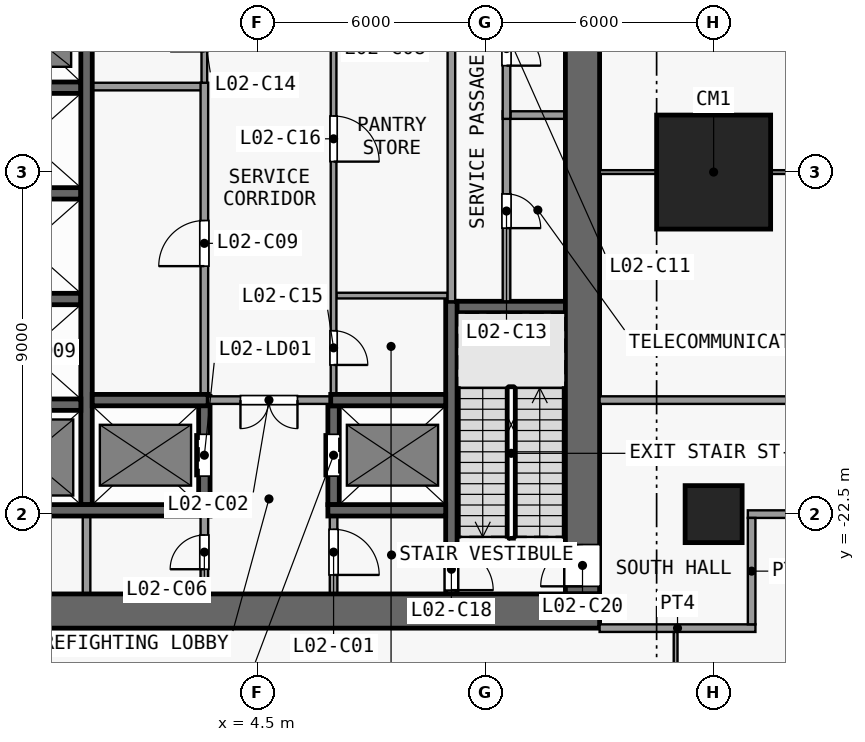
"""IFC4 building model, lengths in metres.
Left out: names, types, materials, properties, quantities, classifications, styles, units other than length and angle.
Written with IfcOpenShell. Run it as: python <this file> out.ifc"""

import sys

from ifc_helpers import new_model, si_unit, direction, frame, frame_2d, origin, origin_2d, place, context, subcontext, project, spatial, rectangle, extrude, element, fill, save


model = new_model("IFC4")
c1 = context("Model", 3, precision=1e-05, world=origin(), true_north=direction((0.0, 1.0)))
c2 = subcontext(c1, "Body", "Model", "MODEL_VIEW")
j1 = project(units=[si_unit("LENGTHUNIT", "METRE"), si_unit("PLANEANGLEUNIT", "RADIAN")], contexts=[c1])
p1 = place(None, origin())
s1 = spatial("IfcSite", under=j1, at=p1, CompositionType="ELEMENT")
p2 = place(p1, origin())
s2 = spatial("IfcBuilding", under=s1, at=p2, CompositionType="ELEMENT")
p3 = place(p2, frame((0.0, 0.0, 13.5)))
s3 = spatial("IfcBuildingStorey", under=s2, at=p3, CompositionType="ELEMENT", Elevation=13.5)
p4 = place(p3, frame((16.5, -22.5, 0.0), z_axis=(0.0, 0.0, 1.0), x_axis=(1.0, 0.0, 0.0)))
e1 = element("IfcColumn", 1, at=p4, inside=s3, PredefinedType="COLUMN", context=c2, shape_type="SweptSolid", body=[
    extrude(rectangle(XDim=1.5, YDim=1.5, at=origin_2d()), origin(), (0.0, 0.0, 1.0), 5.0),
])
p5 = place(p3, frame((16.5, -13.5, 0.0), z_axis=(0.0, 0.0, 1.0), x_axis=(1.0, 0.0, 0.0)))
e2 = element("IfcColumn", 2, at=p5, inside=s3, PredefinedType="COLUMN", context=c2, shape_type="SweptSolid", body=[
    extrude(rectangle(XDim=3.0, YDim=3.0, at=origin_2d()), origin(), (0.0, 0.0, 1.0), 5.0),
])
p6 = place(p3, frame((-13.5, -25.05, 0.0), z_axis=(0.0, 0.0, 1.0), x_axis=(1.0, 0.0, 0.0)))
e3 = element("IfcWall", 3, at=p6, inside=s3, PredefinedType="SHEAR", context=c2, shape_type="SweptSolid", body=[
    extrude(rectangle(XDim=27.0, YDim=0.9, at=frame_2d((13.5, 0.0))), origin(), (0.0, 0.0, 1.0), 4.65),
])
p7 = place(p3, frame((13.05, -24.6, 0.0), z_axis=(0.0, 0.0, 1.0), x_axis=(0.0, 1.0, 0.0)))
e4 = element("IfcWall", 4, at=p7, inside=s3, PredefinedType="SHEAR", context=c2, shape_type="SweptSolid", body=[
    extrude(rectangle(XDim=16.1, YDim=0.9, at=frame_2d((8.05, 0.0))), origin(), (0.0, 0.0, 1.0), 4.65),
])
p8 = place(p7, frame((0.2, 0.0, 0.0)))
e5 = element("IfcOpeningElement", 5, at=p8, cuts=e4, PredefinedType="OPENING", context=c2, shape_type="SweptSolid", body=[
    extrude(rectangle(XDim=1.1, YDim=2.1, at=frame_2d((0.55, 1.05))), frame((0.0, 0.46, 0.0), z_axis=(0.0, -1.0, 0.0), x_axis=(1.0, 0.0, 0.0)), (0.0, 0.0, 1.0), 0.92),
])
p9 = place(p3, frame((-2.95, -22.4, 0.0), z_axis=(0.0, 0.0, 1.0), x_axis=(1.0, 0.0, 0.0)))
e6 = element("IfcWall", 6, at=p9, inside=s3, PredefinedType="SHEAR", context=c2, shape_type="SweptSolid", body=[
    extrude(rectangle(XDim=6.2, YDim=0.3, at=frame_2d((3.1, 0.0))), origin(), (0.0, 0.0, 1.0), 4.65),
])
p10 = place(p3, frame((6.35, -22.4, 0.0), z_axis=(0.0, 0.0, 1.0), x_axis=(1.0, 0.0, 0.0)))
e7 = element("IfcWall", 7, at=p10, inside=s3, PredefinedType="SHEAR", context=c2, shape_type="SweptSolid", body=[
    extrude(rectangle(XDim=3.1, YDim=0.3, at=frame_2d((1.55, 0.0))), origin(), (0.0, 0.0, 1.0), 4.65),
])
p11 = place(p3, frame((-2.95, -19.62, 0.0), z_axis=(0.0, 0.0, 1.0), x_axis=(1.0, 0.0, 0.0)))
e8 = element("IfcWall", 8, at=p11, inside=s3, PredefinedType="SHEAR", context=c2, shape_type="SweptSolid", body=[
    extrude(rectangle(XDim=2.8, YDim=0.3, at=frame_2d((1.4, 0.0))), origin(), (0.0, 0.0, 1.0), 4.65),
])
p12 = place(p3, frame((0.15, -19.5, 0.0), z_axis=(0.0, 0.0, 1.0), x_axis=(1.0, 0.0, 0.0)))
e9 = element("IfcWall", 9, at=p12, inside=s3, PredefinedType="SHEAR", context=c2, shape_type="SweptSolid", body=[
    extrude(rectangle(XDim=3.05, YDim=0.3, at=frame_2d((1.525, 0.0))), origin(), (0.0, 0.0, 1.0), 4.65),
])
p13 = place(p3, frame((6.575, -19.5, 0.0), z_axis=(0.0, 0.0, 1.0), x_axis=(-1.0, 0.0, 0.0)))
e10 = element("IfcWall", 10, at=p13, inside=s3, PredefinedType="PARTITIONING", context=c2, shape_type="SweptSolid", body=[
    extrude(rectangle(XDim=3.375, YDim=0.2, at=frame_2d((1.688, 0.0))), origin(), (0.0, 0.0, 1.0), 4.65),
])
p14 = place(p13, frame((1.025, 0.0, 0.0)))
e11 = element("IfcOpeningElement", 11, at=p14, cuts=e10, PredefinedType="OPENING", context=c2, shape_type="SweptSolid", body=[
    extrude(rectangle(XDim=1.5, YDim=2.1, at=frame_2d((0.75, 1.05))), frame((0.0, 0.11, 0.0), z_axis=(0.0, -1.0, 0.0), x_axis=(1.0, 0.0, 0.0)), (0.0, 0.0, 1.0), 0.22),
])
p15 = place(p3, frame((6.425, -19.5, 0.0), z_axis=(0.0, 0.0, 1.0), x_axis=(1.0, 0.0, 0.0)))
e12 = element("IfcWall", 12, at=p15, inside=s3, PredefinedType="SHEAR", context=c2, shape_type="SweptSolid", body=[
    extrude(rectangle(XDim=3.025, YDim=0.3, at=frame_2d((1.512, 0.0))), origin(), (0.0, 0.0, 1.0), 4.65),
])
p16 = place(p3, frame((9.5, -17.05, 0.0), z_axis=(0.0, 0.0, 1.0), x_axis=(1.0, 0.0, 0.0)))
e13 = element("IfcWall", 13, at=p16, inside=s3, PredefinedType="SHEAR", context=c2, shape_type="SweptSolid", body=[
    extrude(rectangle(XDim=3.1, YDim=0.3, at=frame_2d((1.55, 0.0))), origin(), (0.0, 0.0, 1.0), 4.65),
])
p17 = place(p3, frame((-2.95, -16.84, 0.0), z_axis=(0.0, 0.0, 1.0), x_axis=(1.0, 0.0, 0.0)))
e14 = element("IfcWall", 14, at=p17, inside=s3, PredefinedType="SHEAR", context=c2, shape_type="SweptSolid", body=[
    extrude(rectangle(XDim=2.8, YDim=0.3, at=frame_2d((1.4, 0.0))), origin(), (0.0, 0.0, 1.0), 4.65),
])
p18 = place(p3, frame((6.575, -16.75, 0.0), z_axis=(0.0, 0.0, 1.0), x_axis=(1.0, 0.0, 0.0)))
e15 = element("IfcWall", 15, at=p18, inside=s3, PredefinedType="PARTITIONING", context=c2, shape_type="SweptSolid", body=[
    extrude(rectangle(XDim=2.925, YDim=0.15, at=frame_2d((1.462, 0.0))), origin(), (0.0, 0.0, 1.0), 4.65),
])
p19 = place(p3, frame((-2.95, -14.06, 0.0), z_axis=(0.0, 0.0, 1.0), x_axis=(1.0, 0.0, 0.0)))
e16 = element("IfcWall", 16, at=p19, inside=s3, PredefinedType="SHEAR", context=c2, shape_type="SweptSolid", body=[
    extrude(rectangle(XDim=2.8, YDim=0.3, at=frame_2d((1.4, 0.0))), origin(), (0.0, 0.0, 1.0), 4.65),
])
p20 = place(p3, frame((11.15, -12.0, 0.0), z_axis=(0.0, 0.0, 1.0), x_axis=(1.0, 0.0, 0.0)))
e17 = element("IfcWall", 17, at=p20, inside=s3, PredefinedType="PARTITIONING", context=c2, shape_type="SweptSolid", body=[
    extrude(rectangle(XDim=1.45, YDim=0.2, at=frame_2d((0.725, 0.0))), origin(), (0.0, 0.0, 1.0), 4.65),
])
p21 = place(p3, frame((-2.95, -11.28, 0.0), z_axis=(0.0, 0.0, 1.0), x_axis=(1.0, 0.0, 0.0)))
e18 = element("IfcWall", 18, at=p21, inside=s3, PredefinedType="SHEAR", context=c2, shape_type="SweptSolid", body=[
    extrude(rectangle(XDim=2.8, YDim=0.3, at=frame_2d((1.4, 0.0))), origin(), (0.0, 0.0, 1.0), 4.65),
])
p22 = place(p3, frame((0.15, -11.25, 0.0), z_axis=(0.0, 0.0, 1.0), x_axis=(1.0, 0.0, 0.0)))
e19 = element("IfcWall", 19, at=p22, inside=s3, PredefinedType="PARTITIONING", context=c2, shape_type="SweptSolid", body=[
    extrude(rectangle(XDim=3.025, YDim=0.2, at=frame_2d((1.513, 0.0))), origin(), (0.0, 0.0, 1.0), 4.65),
])
p23 = place(p3, frame((0.0, -24.6, 0.0), z_axis=(0.0, 0.0, 1.0), x_axis=(0.0, 1.0, 0.0)))
e20 = element("IfcWall", 20, at=p23, inside=s3, PredefinedType="PARTITIONING", context=c2, shape_type="SweptSolid", body=[
    extrude(rectangle(XDim=2.05, YDim=0.2, at=frame_2d((1.025, 0.0))), origin(), (0.0, 0.0, 1.0), 4.65),
])
p24 = place(p3, frame((0.0, -22.25, 0.0), z_axis=(0.0, 0.0, 1.0), x_axis=(0.0, 1.0, 0.0)))
e21 = element("IfcWall", 21, at=p24, inside=s3, PredefinedType="SHEAR", context=c2, shape_type="SweptSolid", body=[
    extrude(rectangle(XDim=13.75, YDim=0.3, at=frame_2d((6.875, 0.0))), origin(), (0.0, 0.0, 1.0), 4.65),
])
p25 = place(p3, frame((3.1, -24.6, 0.0), z_axis=(0.0, 0.0, 1.0), x_axis=(0.0, 1.0, 0.0)))
e22 = element("IfcWall", 22, at=p25, inside=s3, PredefinedType="PARTITIONING", context=c2, shape_type="SweptSolid", body=[
    extrude(rectangle(XDim=2.05, YDim=0.2, at=frame_2d((1.025, 0.0))), origin(), (0.0, 0.0, 1.0), 4.65),
])
p26 = place(p25, frame((0.65, 0.0, 0.0)))
e23 = element("IfcOpeningElement", 23, at=p26, cuts=e22, PredefinedType="OPENING", context=c2, shape_type="SweptSolid", body=[
    extrude(rectangle(XDim=0.9, YDim=2.1, at=frame_2d((0.45, 1.05))), frame((0.0, 0.11, 0.0), z_axis=(0.0, -1.0, 0.0), x_axis=(1.0, 0.0, 0.0)), (0.0, 0.0, 1.0), 0.22),
])
p27 = place(p3, frame((3.1, -22.25, 0.0), z_axis=(0.0, 0.0, 1.0), x_axis=(0.0, 1.0, 0.0)))
e24 = element("IfcWall", 24, at=p27, inside=s3, PredefinedType="SHEAR", context=c2, shape_type="SweptSolid", body=[
    extrude(rectangle(XDim=2.85, YDim=0.3, at=frame_2d((1.425, 0.0))), origin(), (0.0, 0.0, 1.0), 4.65),
])
p28 = place(p27, frame((0.75, 0.0, 0.0)))
e25 = element("IfcOpeningElement", 25, at=p28, cuts=e24, PredefinedType="OPENING", context=c2, shape_type="SweptSolid", body=[
    extrude(rectangle(XDim=1.1, YDim=2.1, at=frame_2d((0.55, 1.05))), frame((0.0, 0.16, 0.0), z_axis=(0.0, -1.0, 0.0), x_axis=(1.0, 0.0, 0.0)), (0.0, 0.0, 1.0), 0.32),
])
p29 = place(p3, frame((3.1, -19.6, 0.0), z_axis=(0.0, 0.0, 1.0), x_axis=(0.0, 1.0, 0.0)))
e26 = element("IfcWall", 26, at=p29, inside=s3, PredefinedType="PARTITIONING", context=c2, shape_type="SweptSolid", body=[
    extrude(rectangle(XDim=8.45, YDim=0.2, at=frame_2d((4.225, 0.0))), origin(), (0.0, 0.0, 1.0), 4.65),
])
p30 = place(p29, frame((3.625, 0.0, 0.0)))
e27 = element("IfcOpeningElement", 27, at=p30, cuts=e26, PredefinedType="OPENING", context=c2, shape_type="SweptSolid", body=[
    extrude(rectangle(XDim=1.2, YDim=2.1, at=frame_2d((0.6, 1.05))), frame((0.0, 0.11, 0.0), z_axis=(0.0, -1.0, 0.0), x_axis=(1.0, 0.0, 0.0)), (0.0, 0.0, 1.0), 0.22),
])
p31 = place(p3, frame((3.1, -11.15, 0.0), z_axis=(0.0, 0.0, 1.0), x_axis=(0.0, 1.0, 0.0)))
e28 = element("IfcWall", 28, at=p31, inside=s3, PredefinedType="PARTITIONING", context=c2, shape_type="SweptSolid", body=[
    extrude(rectangle(XDim=2.65, YDim=0.15, at=frame_2d((1.325, 0.0))), origin(), (0.0, 0.0, 1.0), 4.65),
])
p32 = place(p31, frame((0.825, 0.0, 0.0)))
e29 = element("IfcOpeningElement", 29, at=p32, cuts=e28, PredefinedType="OPENING", context=c2, shape_type="SweptSolid", body=[
    extrude(rectangle(XDim=0.9, YDim=2.1, at=frame_2d((0.45, 1.05))), frame((0.0, 0.085, 0.0), z_axis=(0.0, -1.0, 0.0), x_axis=(1.0, 0.0, 0.0)), (0.0, 0.0, 1.0), 0.17),
])
p33 = place(p3, frame((6.5, -22.55, 0.0), z_axis=(0.0, 0.0, 1.0), x_axis=(0.0, -1.0, 0.0)))
e30 = element("IfcWall", 30, at=p33, inside=s3, PredefinedType="PARTITIONING", context=c2, shape_type="SweptSolid", body=[
    extrude(rectangle(XDim=2.05, YDim=0.2, at=frame_2d((1.025, 0.0))), origin(), (0.0, 0.0, 1.0), 4.65),
])
p34 = place(p33, frame((0.35, 0.0, 0.0)))
e31 = element("IfcOpeningElement", 31, at=p34, cuts=e30, PredefinedType="OPENING", context=c2, shape_type="SweptSolid", body=[
    extrude(rectangle(XDim=1.2, YDim=2.1, at=frame_2d((0.6, 1.05))), frame((0.0, 0.11, 0.0), z_axis=(0.0, -1.0, 0.0), x_axis=(1.0, 0.0, 0.0)), (0.0, 0.0, 1.0), 0.22),
])
p35 = place(p3, frame((6.5, -22.25, 0.0), z_axis=(0.0, 0.0, 1.0), x_axis=(0.0, 1.0, 0.0)))
e32 = element("IfcWall", 32, at=p35, inside=s3, PredefinedType="SHEAR", context=c2, shape_type="SweptSolid", body=[
    extrude(rectangle(XDim=2.6, YDim=0.3, at=frame_2d((1.3, 0.0))), origin(), (0.0, 0.0, 1.0), 4.65),
])
p36 = place(p35, frame((0.75, 0.0, 0.0)))
e33 = element("IfcOpeningElement", 33, at=p36, cuts=e32, PredefinedType="OPENING", context=c2, shape_type="SweptSolid", body=[
    extrude(rectangle(XDim=1.1, YDim=2.1, at=frame_2d((0.55, 1.05))), frame((0.0, 0.16, 0.0), z_axis=(0.0, -1.0, 0.0), x_axis=(1.0, 0.0, 0.0)), (0.0, 0.0, 1.0), 0.32),
])
p37 = place(p3, frame((6.5, -8.5, 0.0), z_axis=(0.0, 0.0, 1.0), x_axis=(0.0, -1.0, 0.0)))
e34 = element("IfcWall", 34, at=p37, inside=s3, PredefinedType="PARTITIONING", context=c2, shape_type="SweptSolid", body=[
    extrude(rectangle(XDim=10.85, YDim=0.15, at=frame_2d((5.425, 0.0))), origin(), (0.0, 0.0, 1.0), 4.65),
])
p38 = place(p37, frame((9.175, 0.0, 0.0)))
e35 = element("IfcOpeningElement", 35, at=p38, cuts=e34, PredefinedType="OPENING", context=c2, shape_type="SweptSolid", body=[
    extrude(rectangle(XDim=0.9, YDim=2.1, at=frame_2d((0.45, 1.05))), frame((0.0, 0.085, 0.0), z_axis=(0.0, -1.0, 0.0), x_axis=(1.0, 0.0, 0.0)), (0.0, 0.0, 1.0), 0.17),
])
p39 = place(p37, frame((3.525, 0.0, 0.0)))
e36 = element("IfcOpeningElement", 36, at=p39, cuts=e34, PredefinedType="OPENING", context=c2, shape_type="SweptSolid", body=[
    extrude(rectangle(XDim=1.2, YDim=2.1, at=frame_2d((0.6, 1.05))), frame((0.0, 0.085, 0.0), z_axis=(0.0, -1.0, 0.0), x_axis=(1.0, 0.0, 0.0)), (0.0, 0.0, 1.0), 0.17),
])
p40 = place(p3, frame((9.6, -16.9, 0.0), z_axis=(0.0, 0.0, 1.0), x_axis=(0.0, -1.0, 0.0)))
e37 = element("IfcWall", 37, at=p40, inside=s3, PredefinedType="SHEAR", context=c2, shape_type="SweptSolid", body=[
    extrude(rectangle(XDim=7.7, YDim=0.3, at=frame_2d((3.85, 0.0))), origin(), (0.0, 0.0, 1.0), 4.65),
])
p41 = place(p40, frame((6.5, 0.0, 0.0)))
e38 = element("IfcOpeningElement", 38, at=p41, cuts=e37, PredefinedType="OPENING", context=c2, shape_type="SweptSolid", body=[
    extrude(rectangle(XDim=1.1, YDim=2.1, at=frame_2d((0.55, 1.05))), frame((0.0, 0.16, 0.0), z_axis=(0.0, -1.0, 0.0), x_axis=(1.0, 0.0, 0.0)), (0.0, 0.0, 1.0), 0.32),
])
p42 = place(p3, frame((9.6, -16.9, 0.0), z_axis=(0.0, 0.0, 1.0), x_axis=(0.0, 1.0, 0.0)))
e39 = element("IfcWall", 39, at=p42, inside=s3, PredefinedType="PARTITIONING", context=c2, shape_type="SweptSolid", body=[
    extrude(rectangle(XDim=8.4, YDim=0.2, at=frame_2d((4.2, 0.0))), origin(), (0.0, 0.0, 1.0), 4.65),
])
p43 = place(p3, frame((11.05, -11.9, 0.0), z_axis=(0.0, 0.0, 1.0), x_axis=(0.0, -1.0, 0.0)))
e40 = element("IfcWall", 40, at=p43, inside=s3, PredefinedType="PARTITIONING", context=c2, shape_type="SweptSolid", body=[
    extrude(rectangle(XDim=5.0, YDim=0.2, at=frame_2d((2.5, 0.0))), origin(), (0.0, 0.0, 1.0), 4.65),
])
p44 = place(p43, frame((2.175, 0.0, 0.0)))
e41 = element("IfcOpeningElement", 41, at=p44, cuts=e40, PredefinedType="OPENING", context=c2, shape_type="SweptSolid", body=[
    extrude(rectangle(XDim=0.9, YDim=2.1, at=frame_2d((0.45, 1.05))), frame((0.0, 0.11, 0.0), z_axis=(0.0, -1.0, 0.0), x_axis=(1.0, 0.0, 0.0)), (0.0, 0.0, 1.0), 0.22),
])
p45 = place(p3, frame((11.05, -8.5, 0.0), z_axis=(0.0, 0.0, 1.0), x_axis=(0.0, -1.0, 0.0)))
e42 = element("IfcWall", 42, at=p45, inside=s3, PredefinedType="PARTITIONING", context=c2, shape_type="SweptSolid", body=[
    extrude(rectangle(XDim=3.6, YDim=0.2, at=frame_2d((1.8, 0.0))), origin(), (0.0, 0.0, 1.0), 4.65),
])
p46 = place(p45, frame((1.3, 0.0, 0.0)))
e43 = element("IfcOpeningElement", 43, at=p46, cuts=e42, PredefinedType="OPENING", context=c2, shape_type="SweptSolid", body=[
    extrude(rectangle(XDim=0.9, YDim=2.1, at=frame_2d((0.45, 1.05))), frame((0.0, 0.11, 0.0), z_axis=(0.0, -1.0, 0.0), x_axis=(1.0, 0.0, 0.0)), (0.0, 0.0, 1.0), 0.22),
])
p47 = place(p3, frame((13.5, -25.5, 0.0), z_axis=(0.0, 0.0, 1.0), x_axis=(1.0, 0.0, 0.0)))
e44 = element("IfcWall", 44, at=p47, inside=s3, PredefinedType="PARTITIONING", context=c2, shape_type="SweptSolid", body=[
    extrude(rectangle(XDim=4.1, YDim=0.2, at=frame_2d((2.05, 0.0))), origin(), (0.0, 0.0, 1.0), 4.65),
])
p48 = place(p3, frame((17.4, -22.5, 0.0), z_axis=(0.0, 0.0, 1.0), x_axis=(1.0, 0.0, 0.0)))
e45 = element("IfcWall", 45, at=p48, inside=s3, PredefinedType="PARTITIONING", context=c2, shape_type="SweptSolid", body=[
    extrude(rectangle(XDim=14.1, YDim=0.2, at=frame_2d((7.05, 0.0))), origin(), (0.0, 0.0, 1.0), 4.65),
])
p49 = place(p3, frame((13.5, -19.5, 0.0), z_axis=(0.0, 0.0, 1.0), x_axis=(1.0, 0.0, 0.0)))
e46 = element("IfcWall", 46, at=p49, inside=s3, PredefinedType="PARTITIONING", context=c2, shape_type="SweptSolid", body=[
    extrude(rectangle(XDim=15.1, YDim=0.2, at=frame_2d((7.55, 0.0))), origin(), (0.0, 0.0, 1.0), 4.65),
])
p50 = place(p49, frame((7.0, 0.0, 0.0)))
e47 = element("IfcOpeningElement", 47, at=p50, cuts=e46, PredefinedType="OPENING", context=c2, shape_type="SweptSolid", body=[
    extrude(rectangle(XDim=1.0, YDim=2.1, at=frame_2d((0.5, 1.05))), frame((0.0, 0.11, 0.0), z_axis=(0.0, -1.0, 0.0), x_axis=(1.0, 0.0, 0.0)), (0.0, 0.0, 1.0), 0.22),
])
p51 = place(p3, frame((13.5, -13.5, 0.0), z_axis=(0.0, 0.0, 1.0), x_axis=(1.0, 0.0, 0.0)))
e48 = element("IfcWall", 48, at=p51, inside=s3, PredefinedType="PARTITIONING", context=c2, shape_type="SweptSolid", body=[
    extrude(rectangle(XDim=14.9, YDim=0.1, at=frame_2d((7.45, 0.0))), origin(), (0.0, 0.0, 1.0), 4.65),
])
p52 = place(p3, frame((15.5, -31.4, 0.0), z_axis=(0.0, 0.0, 1.0), x_axis=(0.0, 1.0, 0.0)))
e49 = element("IfcWall", 49, at=p52, inside=s3, PredefinedType="PARTITIONING", context=c2, shape_type="SweptSolid", body=[
    extrude(rectangle(XDim=5.8, YDim=0.1, at=frame_2d((2.9, 0.0))), origin(), (0.0, 0.0, 1.0), 4.65),
])
p53 = place(p3, frame((17.5, -25.4, 0.0), z_axis=(0.0, 0.0, 1.0), x_axis=(0.0, 1.0, 0.0)))
e50 = element("IfcWall", 50, at=p53, inside=s3, PredefinedType="PARTITIONING", context=c2, shape_type="SweptSolid", body=[
    extrude(rectangle(XDim=2.8, YDim=0.2, at=frame_2d((1.4, 0.0))), origin(), (0.0, 0.0, 1.0), 4.65),
])
p54 = place(p28, origin())
e51 = element("IfcDoor", 51, at=p54, inside=s3, OperationType="DOUBLE_DOOR_SLIDING", PredefinedType="DOOR", context=c2, shape_type="SweptSolid", body=[
    extrude(rectangle(XDim=1.1, YDim=2.1, at=frame_2d((0.55, 1.05))), frame((0.0, 0.025, 0.0), z_axis=(0.0, -1.0, 0.0), x_axis=(1.0, 0.0, 0.0)), (0.0, 0.0, 1.0), 0.05),
])
fill(e25, e51)
p55 = place(p36, origin())
e52 = element("IfcDoor", 52, at=p55, inside=s3, OperationType="DOUBLE_DOOR_SLIDING", PredefinedType="DOOR", context=c2, shape_type="SweptSolid", body=[
    extrude(rectangle(XDim=1.1, YDim=2.1, at=frame_2d((0.55, 1.05))), frame((0.0, 0.025, 0.0), z_axis=(0.0, -1.0, 0.0), x_axis=(1.0, 0.0, 0.0)), (0.0, 0.0, 1.0), 0.05),
])
fill(e33, e52)
p56 = place(p34, origin())
e53 = element("IfcDoor", 53, at=p56, inside=s3, OperationType="SINGLE_SWING_RIGHT", PredefinedType="DOOR", context=c2, shape_type="SweptSolid", body=[
    extrude(rectangle(XDim=1.2, YDim=2.1, at=frame_2d((0.6, 1.05))), frame((0.0, 0.025, 0.0), z_axis=(0.0, -1.0, 0.0), x_axis=(1.0, 0.0, 0.0)), (0.0, 0.0, 1.0), 0.05),
])
fill(e31, e53)
p57 = place(p14, origin())
e54 = element("IfcDoor", 54, at=p57, inside=s3, OperationType="DOUBLE_DOOR_SINGLE_SWING", PredefinedType="DOOR", context=c2, shape_type="SweptSolid", body=[
    extrude(rectangle(XDim=1.5, YDim=2.1, at=frame_2d((0.75, 1.05))), frame((0.0, 0.025, 0.0), z_axis=(0.0, -1.0, 0.0), x_axis=(1.0, 0.0, 0.0)), (0.0, 0.0, 1.0), 0.05),
])
fill(e11, e54)
p58 = place(p26, origin())
e55 = element("IfcDoor", 55, at=p58, inside=s3, OperationType="SINGLE_SWING_LEFT", PredefinedType="DOOR", context=c2, shape_type="SweptSolid", body=[
    extrude(rectangle(XDim=0.9, YDim=2.1, at=frame_2d((0.45, 1.05))), frame((0.0, 0.025, 0.0), z_axis=(0.0, -1.0, 0.0), x_axis=(1.0, 0.0, 0.0)), (0.0, 0.0, 1.0), 0.05),
])
fill(e23, e55)
p59 = place(p46, origin())
e56 = element("IfcDoor", 56, at=p59, inside=s3, OperationType="SINGLE_SWING_RIGHT", PredefinedType="DOOR", context=c2, shape_type="SweptSolid", body=[
    extrude(rectangle(XDim=0.9, YDim=2.1, at=frame_2d((0.45, 1.05))), frame((0.0, 0.025, 0.0), z_axis=(0.0, -1.0, 0.0), x_axis=(1.0, 0.0, 0.0)), (0.0, 0.0, 1.0), 0.05),
])
fill(e43, e56)
p60 = place(p30, origin())
e57 = element("IfcDoor", 57, at=p60, inside=s3, OperationType="SINGLE_SWING_LEFT", PredefinedType="DOOR", context=c2, shape_type="SweptSolid", body=[
    extrude(rectangle(XDim=1.2, YDim=2.1, at=frame_2d((0.6, 1.05))), frame((0.0, 0.025, 0.0), z_axis=(0.0, -1.0, 0.0), x_axis=(1.0, 0.0, 0.0)), (0.0, 0.0, 1.0), 0.05),
])
fill(e27, e57)
p61 = place(p44, origin())
e58 = element("IfcDoor", 58, at=p61, inside=s3, OperationType="SINGLE_SWING_RIGHT", PredefinedType="DOOR", context=c2, shape_type="SweptSolid", body=[
    extrude(rectangle(XDim=0.9, YDim=2.1, at=frame_2d((0.45, 1.05))), frame((0.0, 0.025, 0.0), z_axis=(0.0, -1.0, 0.0), x_axis=(1.0, 0.0, 0.0)), (0.0, 0.0, 1.0), 0.05),
])
fill(e41, e58)
p62 = place(p38, origin())
e59 = element("IfcDoor", 59, at=p62, inside=s3, OperationType="SINGLE_SWING_RIGHT", PredefinedType="DOOR", context=c2, shape_type="SweptSolid", body=[
    extrude(rectangle(XDim=0.9, YDim=2.1, at=frame_2d((0.45, 1.05))), frame((0.0, 0.025, 0.0), z_axis=(0.0, -1.0, 0.0), x_axis=(1.0, 0.0, 0.0)), (0.0, 0.0, 1.0), 0.05),
])
fill(e35, e59)
p63 = place(p39, origin())
e60 = element("IfcDoor", 60, at=p63, inside=s3, OperationType="SINGLE_SWING_RIGHT", PredefinedType="DOOR", context=c2, shape_type="SweptSolid", body=[
    extrude(rectangle(XDim=1.2, YDim=2.1, at=frame_2d((0.6, 1.05))), frame((0.0, 0.025, 0.0), z_axis=(0.0, -1.0, 0.0), x_axis=(1.0, 0.0, 0.0)), (0.0, 0.0, 1.0), 0.05),
])
fill(e36, e60)
p64 = place(p41, origin())
e61 = element("IfcDoor", 61, at=p64, inside=s3, OperationType="SINGLE_SWING_RIGHT", PredefinedType="DOOR", context=c2, shape_type="SweptSolid", body=[
    extrude(rectangle(XDim=1.1, YDim=2.1, at=frame_2d((0.55, 1.05))), frame((0.0, 0.025, 0.0), z_axis=(0.0, -1.0, 0.0), x_axis=(1.0, 0.0, 0.0)), (0.0, 0.0, 1.0), 0.05),
])
fill(e38, e61)
p65 = place(p8, origin())
e62 = element("IfcDoor", 62, at=p65, inside=s3, OperationType="SINGLE_SWING_LEFT", PredefinedType="DOOR", context=c2, shape_type="SweptSolid", body=[
    extrude(rectangle(XDim=1.1, YDim=2.1, at=frame_2d((0.55, 1.05))), frame((0.0, 0.025, 0.0), z_axis=(0.0, -1.0, 0.0), x_axis=(1.0, 0.0, 0.0)), (0.0, 0.0, 1.0), 0.05),
])
fill(e5, e62)
save(model, sys.argv[1])
